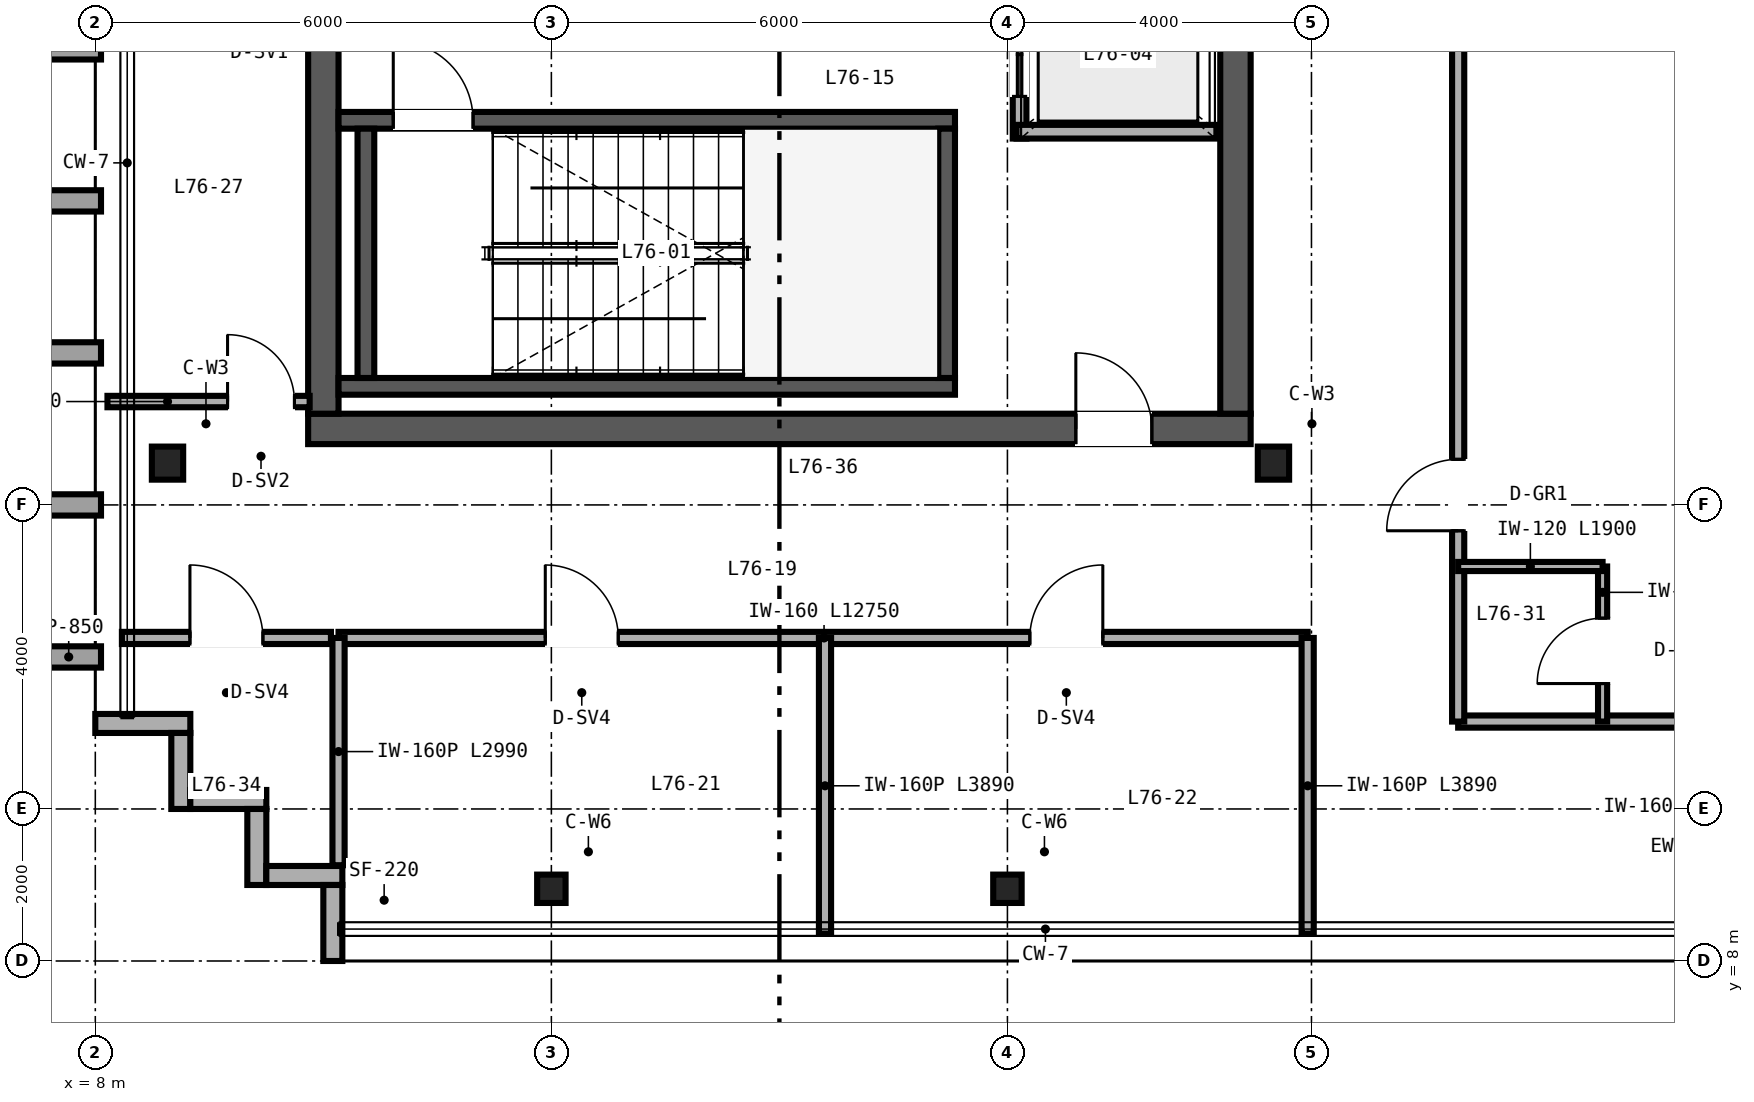
"""IFC4 building model, lengths in metres.
Left out: names, types, materials, properties, quantities, classifications, styles, units other than length and angle.
Written with IfcOpenShell. Run it as: python <this file> out.ifc"""

import sys

from ifc_helpers import new_model, si_unit, direction, frame, frame_2d, origin, origin_2d, place, context, subcontext, project, spatial, rectangle, i_section, extrude, source, transform, mapped, element, fill, save


model = new_model("IFC4")
c1 = context("Model", 3, precision=1e-05, world=origin(), true_north=direction((0.0, 1.0)))
c2 = subcontext(c1, "Body", "Model", "MODEL_VIEW")
j1 = project(units=[si_unit("LENGTHUNIT", "METRE"), si_unit("PLANEANGLEUNIT", "RADIAN")], contexts=[c1])
p1 = place(None, origin())
s1 = spatial("IfcSite", under=j1, at=p1, CompositionType="ELEMENT")
p2 = place(p1, origin())
s2 = spatial("IfcBuilding", under=s1, at=p2, CompositionType="ELEMENT")
p3 = place(p2, frame((0.0, 0.0, 297.6)))
s3 = spatial("IfcBuildingStorey", under=s2, at=p3, CompositionType="ELEMENT", Elevation=297.6)
p4 = place(p3, frame((10.8, 15.0, 0.0), z_axis=(0.0, 0.0, 1.0), x_axis=(1.0, 0.0, 0.0)))
e1 = element("IfcWall", 1, at=p4, inside=s3, PredefinedType="SHEAR", context=c2, shape_type="SweptSolid", body=[
    extrude(rectangle(XDim=12.4, YDim=0.4, at=frame_2d((6.2, 0.0))), origin(), (0.0, 0.0, 1.0), 3.32),
])
p5 = place(p4, frame((10.1, 0.0, 0.0)))
e2 = element("IfcOpeningElement", 2, at=p5, cuts=e1, PredefinedType="OPENING", context=c2, shape_type="SweptSolid", body=[
    extrude(rectangle(XDim=1.0, YDim=2.15, at=frame_2d((0.5, 1.075))), frame((0.0, 0.21, 0.0), z_axis=(0.0, -1.0, 0.0), x_axis=(1.0, 0.0, 0.0)), (0.0, 0.0, 1.0), 0.42),
])
for number, where, z_axis, x_axis in (
    (3, (11.0, 15.2, 0.0), (0.0, 0.0, 1.0), (0.0, 1.0, 0.0)),
    (4, (23.0, 15.2, 0.0), (0.0, 0.0, 1.0), (0.0, 1.0, 0.0)),
):
    element("IfcWall", number, at=place(p3, frame(where, z_axis=z_axis, x_axis=x_axis)), inside=s3, PredefinedType="SHEAR", context=c2, shape_type="SweptSolid", body=[
        extrude(rectangle(XDim=21.6, YDim=0.4, at=frame_2d((10.8, 0.0))), origin(), (0.0, 0.0, 1.0), 3.32),
    ])
p6 = place(p3, frame((11.2, 15.56, 0.0), z_axis=(0.0, 0.0, 1.0), x_axis=(1.0, 0.0, 0.0)))
e5 = element("IfcWall", 5, at=p6, inside=s3, PredefinedType="SHEAR", context=c2, shape_type="SweptSolid", body=[
    extrude(rectangle(XDim=8.11, YDim=0.22, at=frame_2d((4.055, 0.0))), origin(), (0.0, 0.0, 1.0), 3.4),
])
p7 = place(p3, frame((11.2, 19.06, 0.0), z_axis=(0.0, 0.0, 1.0), x_axis=(1.0, 0.0, 0.0)))
e6 = element("IfcWall", 6, at=p7, inside=s3, PredefinedType="SHEAR", context=c2, shape_type="SweptSolid", body=[
    extrude(rectangle(XDim=8.11, YDim=0.22, at=frame_2d((4.055, 0.0))), origin(), (0.0, 0.0, 1.0), 3.4),
])
p8 = place(p7, frame((0.72, 0.0, 0.0)))
e7 = element("IfcOpeningElement", 7, at=p8, cuts=e6, PredefinedType="OPENING", context=c2, shape_type="SweptSolid", body=[
    extrude(rectangle(XDim=1.05, YDim=2.15, at=frame_2d((0.525, 1.075))), frame((0.0, 0.12, 0.0), z_axis=(0.0, -1.0, 0.0), x_axis=(1.0, 0.0, 0.0)), (0.0, 0.0, 1.0), 0.24),
])
for number, where, z_axis, x_axis in (
    (8, (11.56, 15.67, 0.0), (0.0, 0.0, 1.0), (0.0, 1.0, 0.0)),
    (9, (19.2, 15.67, 0.0), (0.0, 0.0, 1.0), (0.0, 1.0, 0.0)),
):
    element("IfcWall", number, at=place(p3, frame(where, z_axis=z_axis, x_axis=x_axis)), inside=s3, PredefinedType="SHEAR", context=c2, shape_type="SweptSolid", body=[
        extrude(rectangle(XDim=3.28, YDim=0.22, at=frame_2d((1.64, 0.0))), origin(), (0.0, 0.0, 1.0), 3.4),
    ])
m1 = source(origin(), c2, "Body", "SweptSolid", [
    extrude(i_section(OverallWidth=0.412, OverallDepth=0.435, WebThickness=0.036, FlangeThickness=0.057, FilletRadius=0.025, at=origin_2d()), origin(), (0.0, 0.0, 1.0), 3.32),
])
for number, where, z_axis, x_axis in (
    (10, (8.95, 14.55, 0.0), (0.0, 0.0, 1.0), (1.0, 0.0, 0.0)),
    (11, (23.5, 14.55, 0.0), (0.0, 0.0, 1.0), (1.0, 0.0, 0.0)),
):
    element("IfcColumn", number, at=place(p3, frame(where, z_axis=z_axis, x_axis=x_axis)), inside=s3, PredefinedType="COLUMN", context=c2, shape_type="MappedRepresentation", body=[
        mapped(m1, transform((0.0, 0.0, 0.0), scale=1.0)),
    ])
m2 = source(origin(), c2, "Body", "SweptSolid", [
    extrude(i_section(OverallWidth=0.374, OverallDepth=0.373, WebThickness=0.016, FlangeThickness=0.026, FilletRadius=0.025, at=origin_2d()), origin(), (0.0, 0.0, 1.0), 3.32),
])
for number, where, z_axis, x_axis in (
    (12, (14.0, 8.95, 0.0), (0.0, 0.0, 1.0), (1.0, 0.0, 0.0)),
    (13, (20.0, 8.95, 0.0), (0.0, 0.0, 1.0), (1.0, 0.0, 0.0)),
):
    element("IfcColumn", number, at=place(p3, frame(where, z_axis=z_axis, x_axis=x_axis)), inside=s3, PredefinedType="COLUMN", context=c2, shape_type="MappedRepresentation", body=[
        mapped(m2, transform((0.0, 0.0, 0.0), scale=1.0)),
    ])
p9 = place(p3, frame((8.0, 11.125, 0.0), z_axis=(0.0, 0.0, 1.0), x_axis=(1.0, 0.0, 0.0)))
e14 = element("IfcWall", 14, at=p9, inside=s3, PredefinedType="SOLIDWALL", context=c2, shape_type="SweptSolid", body=[
    extrude(rectangle(XDim=1.25, YDim=0.25, at=frame_2d((0.625, 0.0))), origin(), (0.0, 0.0, 1.0), 3.32),
])
for number, where, z_axis, x_axis in (
    (15, (9.125, 11.0, 0.0), (0.0, 0.0, 1.0), (0.0, -1.0, 0.0)),
    (16, (9.25, 10.125, 0.0), (0.0, 0.0, 1.0), (1.0, 0.0, 0.0)),
    (17, (10.125, 10.0, 0.0), (0.0, 0.0, 1.0), (0.0, -1.0, 0.0)),
    (18, (10.25, 9.125, 0.0), (0.0, 0.0, 1.0), (1.0, 0.0, 0.0)),
    (19, (11.125, 9.0, 0.0), (0.0, 0.0, 1.0), (0.0, -1.0, 0.0)),
):
    element("IfcWall", number, at=place(p3, frame(where, z_axis=z_axis, x_axis=x_axis)), inside=s3, PredefinedType="SOLIDWALL", context=c2, shape_type="SweptSolid", body=[
        extrude(rectangle(XDim=1.0, YDim=0.25, at=frame_2d((0.5, 0.0))), origin(), (0.0, 0.0, 1.0), 3.32),
    ])
p10 = place(p3, frame((20.16, 18.82, 0.0), z_axis=(0.0, 0.0, 1.0), x_axis=(0.0, 1.0, 0.0)))
e20 = element("IfcWall", 20, at=p10, inside=s3, PredefinedType="SOLIDWALL", context=c2, shape_type="SweptSolid", body=[
    extrude(rectangle(XDim=6.32, YDim=0.18, at=frame_2d((3.16, 0.0))), origin(), (0.0, 0.0, 1.0), 2.42),
])
p11 = place(p10, frame((0.555, 0.0, 0.0)))
e21 = element("IfcOpeningElement", 21, at=p11, cuts=e20, PredefinedType="OPENING", context=c2, shape_type="SweptSolid", body=[
    extrude(rectangle(XDim=1.1, YDim=2.2, at=frame_2d((0.55, 1.1))), frame((0.0, 0.1, 0.0), z_axis=(0.0, -1.0, 0.0), x_axis=(1.0, 0.0, 0.0)), (0.0, 0.0, 1.0), 0.2),
])
p12 = place(p10, frame((2.635, 0.0, 0.0)))
e22 = element("IfcOpeningElement", 22, at=p12, cuts=e20, PredefinedType="OPENING", context=c2, shape_type="SweptSolid", body=[
    extrude(rectangle(XDim=1.1, YDim=2.2, at=frame_2d((0.55, 1.1))), frame((0.0, 0.1, 0.0), z_axis=(0.0, -1.0, 0.0), x_axis=(1.0, 0.0, 0.0)), (0.0, 0.0, 1.0), 0.2),
])
p13 = place(p10, frame((4.69, 0.0, 0.0)))
e23 = element("IfcOpeningElement", 23, at=p13, cuts=e20, PredefinedType="OPENING", context=c2, shape_type="SweptSolid", body=[
    extrude(rectangle(XDim=1.1, YDim=2.2, at=frame_2d((0.55, 1.1))), frame((0.0, 0.1, 0.0), z_axis=(0.0, -1.0, 0.0), x_axis=(1.0, 0.0, 0.0)), (0.0, 0.0, 1.0), 0.2),
])
p14 = place(p3, frame((20.12, 18.91, 0.0), z_axis=(0.0, 0.0, 1.0), x_axis=(1.0, 0.0, 0.0)))
e24 = element("IfcWall", 24, at=p14, inside=s3, PredefinedType="SOLIDWALL", context=c2, shape_type="SweptSolid", body=[
    extrude(rectangle(XDim=2.63, YDim=0.18, at=frame_2d((1.315, 0.0))), origin(), (0.0, 0.0, 1.0), 3.32),
])
p15 = place(p3, frame((11.2, 12.25, 0.0), z_axis=(0.0, 0.0, 1.0), x_axis=(1.0, 0.0, 0.0)))
e25 = element("IfcWall", 25, at=p15, inside=s3, PredefinedType="PARTITIONING", context=c2, shape_type="SweptSolid", body=[
    extrude(rectangle(XDim=12.75, YDim=0.16, at=frame_2d((6.375, 0.0))), origin(), (0.0, 0.0, 1.0), 3.32),
])
p16 = place(p15, frame((2.72, 0.0, 0.0)))
e26 = element("IfcOpeningElement", 26, at=p16, cuts=e25, PredefinedType="OPENING", context=c2, shape_type="SweptSolid", body=[
    extrude(rectangle(XDim=0.96, YDim=2.15, at=frame_2d((0.48, 1.075))), frame((0.0, 0.09, 0.0), z_axis=(0.0, -1.0, 0.0), x_axis=(1.0, 0.0, 0.0)), (0.0, 0.0, 1.0), 0.18),
])
p17 = place(p15, frame((9.095, 0.0, 0.0)))
e27 = element("IfcOpeningElement", 27, at=p17, cuts=e25, PredefinedType="OPENING", context=c2, shape_type="SweptSolid", body=[
    extrude(rectangle(XDim=0.96, YDim=2.15, at=frame_2d((0.48, 1.075))), frame((0.0, 0.09, 0.0), z_axis=(0.0, -1.0, 0.0), x_axis=(1.0, 0.0, 0.0)), (0.0, 0.0, 1.0), 0.18),
])
p18 = place(p3, frame((11.2, 9.26, 0.0), z_axis=(0.0, 0.0, 1.0), x_axis=(0.0, 1.0, 0.0)))
e28 = element("IfcWall", 28, at=p18, inside=s3, PredefinedType="PARTITIONING", context=c2, shape_type="SweptSolid", body=[
    extrude(rectangle(XDim=2.99, YDim=0.16, at=frame_2d((1.495, 0.0))), origin(), (0.0, 0.0, 1.0), 3.32),
])
p19 = place(p3, frame((23.95, 8.36, 0.0), z_axis=(0.0, 0.0, 1.0), x_axis=(0.0, 1.0, 0.0)))
e29 = element("IfcWall", 29, at=p19, inside=s3, PredefinedType="PARTITIONING", context=c2, shape_type="SweptSolid", body=[
    extrude(rectangle(XDim=3.89, YDim=0.16, at=frame_2d((1.945, 0.0))), origin(), (0.0, 0.0, 1.0), 3.32),
])
p20 = place(p3, frame((17.6, 8.36, 0.0), z_axis=(0.0, 0.0, 1.0), x_axis=(0.0, 1.0, 0.0)))
e30 = element("IfcWall", 30, at=p20, inside=s3, PredefinedType="PARTITIONING", context=c2, shape_type="SweptSolid", body=[
    extrude(rectangle(XDim=3.89, YDim=0.16, at=frame_2d((1.945, 0.0))), origin(), (0.0, 0.0, 1.0), 2.627),
])
p21 = place(p3, frame((8.16, 15.36, 0.0), z_axis=(0.0, 0.0, 1.0), x_axis=(1.0, 0.0, 0.0)))
e31 = element("IfcWall", 31, at=p21, inside=s3, PredefinedType="PARTITIONING", context=c2, shape_type="SweptSolid", body=[
    extrude(rectangle(XDim=2.66, YDim=0.15, at=frame_2d((1.33, 0.0))), origin(), (0.0, 0.0, 1.0), 2.541),
])
p22 = place(p21, frame((1.58, 0.0, 0.0)))
e32 = element("IfcOpeningElement", 32, at=p22, cuts=e31, PredefinedType="OPENING", context=c2, shape_type="SweptSolid", body=[
    extrude(rectangle(XDim=0.88, YDim=2.15, at=frame_2d((0.44, 1.075))), frame((0.0, 0.085, 0.0), z_axis=(0.0, -1.0, 0.0), x_axis=(1.0, 0.0, 0.0)), (0.0, 0.0, 1.0), 0.17),
])
p23 = place(p3, frame((25.93, 11.15, 0.0), z_axis=(0.0, 0.0, 1.0), x_axis=(1.0, 0.0, 0.0)))
e33 = element("IfcWall", 33, at=p23, inside=s3, PredefinedType="PARTITIONING", context=c2, shape_type="SweptSolid", body=[
    extrude(rectangle(XDim=5.81, YDim=0.16, at=frame_2d((2.905, 0.0))), origin(), (0.0, 0.0, 1.0), 3.32),
])
p24 = place(p3, frame((25.93, 11.15, 0.0), z_axis=(0.0, 0.0, 1.0), x_axis=(0.0, 1.0, 0.0)))
e34 = element("IfcWall", 34, at=p24, inside=s3, PredefinedType="PARTITIONING", context=c2, shape_type="SweptSolid", body=[
    extrude(rectangle(XDim=29.7, YDim=0.16, at=frame_2d((14.85, 0.0))), origin(), (0.0, 0.0, 1.0), 2.464),
])
p25 = place(p24, frame((2.51, 0.0, 0.0)))
e35 = element("IfcOpeningElement", 35, at=p25, cuts=e34, PredefinedType="OPENING", context=c2, shape_type="SweptSolid", body=[
    extrude(rectangle(XDim=0.94, YDim=2.15, at=frame_2d((0.47, 1.075))), frame((0.0, 0.09, 0.0), z_axis=(0.0, -1.0, 0.0), x_axis=(1.0, 0.0, 0.0)), (0.0, 0.0, 1.0), 0.18),
])
p26 = place(p24, frame((17.36, 0.0, 0.0)))
e36 = element("IfcOpeningElement", 36, at=p26, cuts=e34, PredefinedType="OPENING", context=c2, shape_type="SweptSolid", body=[
    extrude(rectangle(XDim=0.94, YDim=2.15, at=frame_2d((0.47, 1.075))), frame((0.0, 0.09, 0.0), z_axis=(0.0, -1.0, 0.0), x_axis=(1.0, 0.0, 0.0)), (0.0, 0.0, 1.0), 0.18),
])
p27 = place(p3, frame((27.83, 11.15, 0.0), z_axis=(0.0, 0.0, 1.0), x_axis=(0.0, 1.0, 0.0)))
e37 = element("IfcWall", 37, at=p27, inside=s3, PredefinedType="PARTITIONING", context=c2, shape_type="SweptSolid", body=[
    extrude(rectangle(XDim=2.04, YDim=0.12, at=frame_2d((1.02, 0.0))), origin(), (0.0, 0.0, 1.0), 3.32),
])
p28 = place(p27, frame((0.5, 0.0, 0.0)))
e38 = element("IfcOpeningElement", 38, at=p28, cuts=e37, PredefinedType="OPENING", context=c2, shape_type="SweptSolid", body=[
    extrude(rectangle(XDim=0.86, YDim=2.1, at=frame_2d((0.43, 1.05))), frame((0.0, 0.07, 0.0), z_axis=(0.0, -1.0, 0.0), x_axis=(1.0, 0.0, 0.0)), (0.0, 0.0, 1.0), 0.14),
])
p29 = place(p3, frame((25.93, 13.19, 0.0), z_axis=(0.0, 0.0, 1.0), x_axis=(1.0, 0.0, 0.0)))
e39 = element("IfcWall", 39, at=p29, inside=s3, PredefinedType="PARTITIONING", context=c2, shape_type="SweptSolid", body=[
    extrude(rectangle(XDim=1.9, YDim=0.12, at=frame_2d((0.95, 0.0))), origin(), (0.0, 0.0, 1.0), 3.32),
])
p30 = place(p3, frame((8.35, 12.25, 0.0), z_axis=(0.0, 0.0, 1.0), x_axis=(1.0, 0.0, 0.0)))
e40 = element("IfcWall", 40, at=p30, inside=s3, PredefinedType="PARTITIONING", context=c2, shape_type="SweptSolid", body=[
    extrude(rectangle(XDim=2.75, YDim=0.16, at=frame_2d((1.375, 0.0))), origin(), (0.0, 0.0, 1.0), 3.32),
])
p31 = place(p30, frame((0.895, 0.0, 0.0)))
e41 = element("IfcOpeningElement", 41, at=p31, cuts=e40, PredefinedType="OPENING", context=c2, shape_type="SweptSolid", body=[
    extrude(rectangle(XDim=0.96, YDim=2.15, at=frame_2d((0.48, 1.075))), frame((0.0, 0.09, 0.0), z_axis=(0.0, -1.0, 0.0), x_axis=(1.0, 0.0, 0.0)), (0.0, 0.0, 1.0), 0.18),
])
m3 = source(origin(), c2, "Body", "SweptSolid", [
    extrude(rectangle(XDim=1.05, YDim=2.15, at=frame_2d((0.525, 1.075))), frame((0.0, 0.025, 0.0), z_axis=(0.0, -1.0, 0.0), x_axis=(1.0, 0.0, 0.0)), (0.0, 0.0, 1.0), 0.05),
])
p32 = place(p8, origin())
e42 = element("IfcDoor", 42, at=p32, inside=s3, OperationType="SINGLE_SWING_LEFT", PredefinedType="DOOR", context=c2, shape_type="MappedRepresentation", body=[
    mapped(m3, transform((0.0, 0.0, 0.0), scale=1.0)),
])
fill(e7, e42)
m4 = source(origin(), c2, "Body", "SweptSolid", [
    extrude(rectangle(XDim=1.1, YDim=2.2, at=frame_2d((0.55, 1.1))), frame((0.0, 0.025, 0.0), z_axis=(0.0, -1.0, 0.0), x_axis=(1.0, 0.0, 0.0)), (0.0, 0.0, 1.0), 0.05),
])
p33 = place(p11, origin())
e43 = element("IfcDoor", 43, at=p33, inside=s3, OperationType="DOUBLE_DOOR_SLIDING", PredefinedType="DOOR", context=c2, shape_type="MappedRepresentation", body=[
    mapped(m4, transform((0.0, 0.0, 0.0), scale=1.0)),
])
fill(e21, e43)
m5 = source(origin(), c2, "Body", "SweptSolid", [
    extrude(rectangle(XDim=1.0, YDim=2.15, at=frame_2d((0.5, 1.075))), frame((0.0, 0.025, 0.0), z_axis=(0.0, -1.0, 0.0), x_axis=(1.0, 0.0, 0.0)), (0.0, 0.0, 1.0), 0.05),
])
p34 = place(p5, origin())
e44 = element("IfcDoor", 44, at=p34, inside=s3, OperationType="SINGLE_SWING_LEFT", PredefinedType="DOOR", context=c2, shape_type="MappedRepresentation", body=[
    mapped(m5, transform((0.0, 0.0, 0.0), scale=1.0)),
])
fill(e2, e44)
m6 = source(origin(), c2, "Body", "SweptSolid", [
    extrude(rectangle(XDim=0.96, YDim=2.15, at=frame_2d((0.48, 1.075))), frame((0.0, 0.025, 0.0), z_axis=(0.0, -1.0, 0.0), x_axis=(1.0, 0.0, 0.0)), (0.0, 0.0, 1.0), 0.05),
])
p35 = place(p16, origin())
e45 = element("IfcDoor", 45, at=p35, inside=s3, OperationType="SINGLE_SWING_LEFT", PredefinedType="DOOR", context=c2, shape_type="MappedRepresentation", body=[
    mapped(m6, transform((0.0, 0.0, 0.0), scale=1.0)),
])
fill(e26, e45)
p36 = place(p17, origin())
e46 = element("IfcDoor", 46, at=p36, inside=s3, OperationType="SINGLE_SWING_RIGHT", PredefinedType="DOOR", context=c2, shape_type="MappedRepresentation", body=[
    mapped(m6, transform((0.0, 0.0, 0.0), scale=1.0)),
])
fill(e27, e46)
m7 = source(origin(), c2, "Body", "SweptSolid", [
    extrude(rectangle(XDim=0.88, YDim=2.15, at=frame_2d((0.44, 1.075))), frame((0.0, 0.025, 0.0), z_axis=(0.0, -1.0, 0.0), x_axis=(1.0, 0.0, 0.0)), (0.0, 0.0, 1.0), 0.05),
])
p37 = place(p22, origin())
e47 = element("IfcDoor", 47, at=p37, inside=s3, OperationType="SINGLE_SWING_LEFT", PredefinedType="DOOR", context=c2, shape_type="MappedRepresentation", body=[
    mapped(m7, transform((0.0, 0.0, 0.0), scale=1.0)),
])
fill(e32, e47)
m8 = source(origin(), c2, "Body", "SweptSolid", [
    extrude(rectangle(XDim=0.86, YDim=2.1, at=frame_2d((0.43, 1.05))), frame((0.0, 0.025, 0.0), z_axis=(0.0, -1.0, 0.0), x_axis=(1.0, 0.0, 0.0)), (0.0, 0.0, 1.0), 0.05),
])
p38 = place(p28, origin())
e48 = element("IfcDoor", 48, at=p38, inside=s3, OperationType="SINGLE_SWING_LEFT", PredefinedType="DOOR", context=c2, shape_type="MappedRepresentation", body=[
    mapped(m8, transform((0.0, 0.0, 0.0), scale=1.0)),
])
fill(e38, e48)
m9 = source(origin(), c2, "Body", "SweptSolid", [
    extrude(rectangle(XDim=0.94, YDim=2.15, at=frame_2d((0.47, 1.075))), frame((0.0, 0.025, 0.0), z_axis=(0.0, -1.0, 0.0), x_axis=(1.0, 0.0, 0.0)), (0.0, 0.0, 1.0), 0.05),
])
p39 = place(p25, origin())
e49 = element("IfcDoor", 49, at=p39, inside=s3, OperationType="SINGLE_SWING_LEFT", PredefinedType="DOOR", context=c2, shape_type="MappedRepresentation", body=[
    mapped(m9, transform((0.0, 0.0, 0.0), scale=1.0)),
])
fill(e35, e49)
p40 = place(p31, origin())
e50 = element("IfcDoor", 50, at=p40, inside=s3, OperationType="SINGLE_SWING_LEFT", PredefinedType="DOOR", context=c2, shape_type="MappedRepresentation", body=[
    mapped(m6, transform((0.0, 0.0, 0.0), scale=1.0)),
])
fill(e41, e50)
save(model, sys.argv[1])
